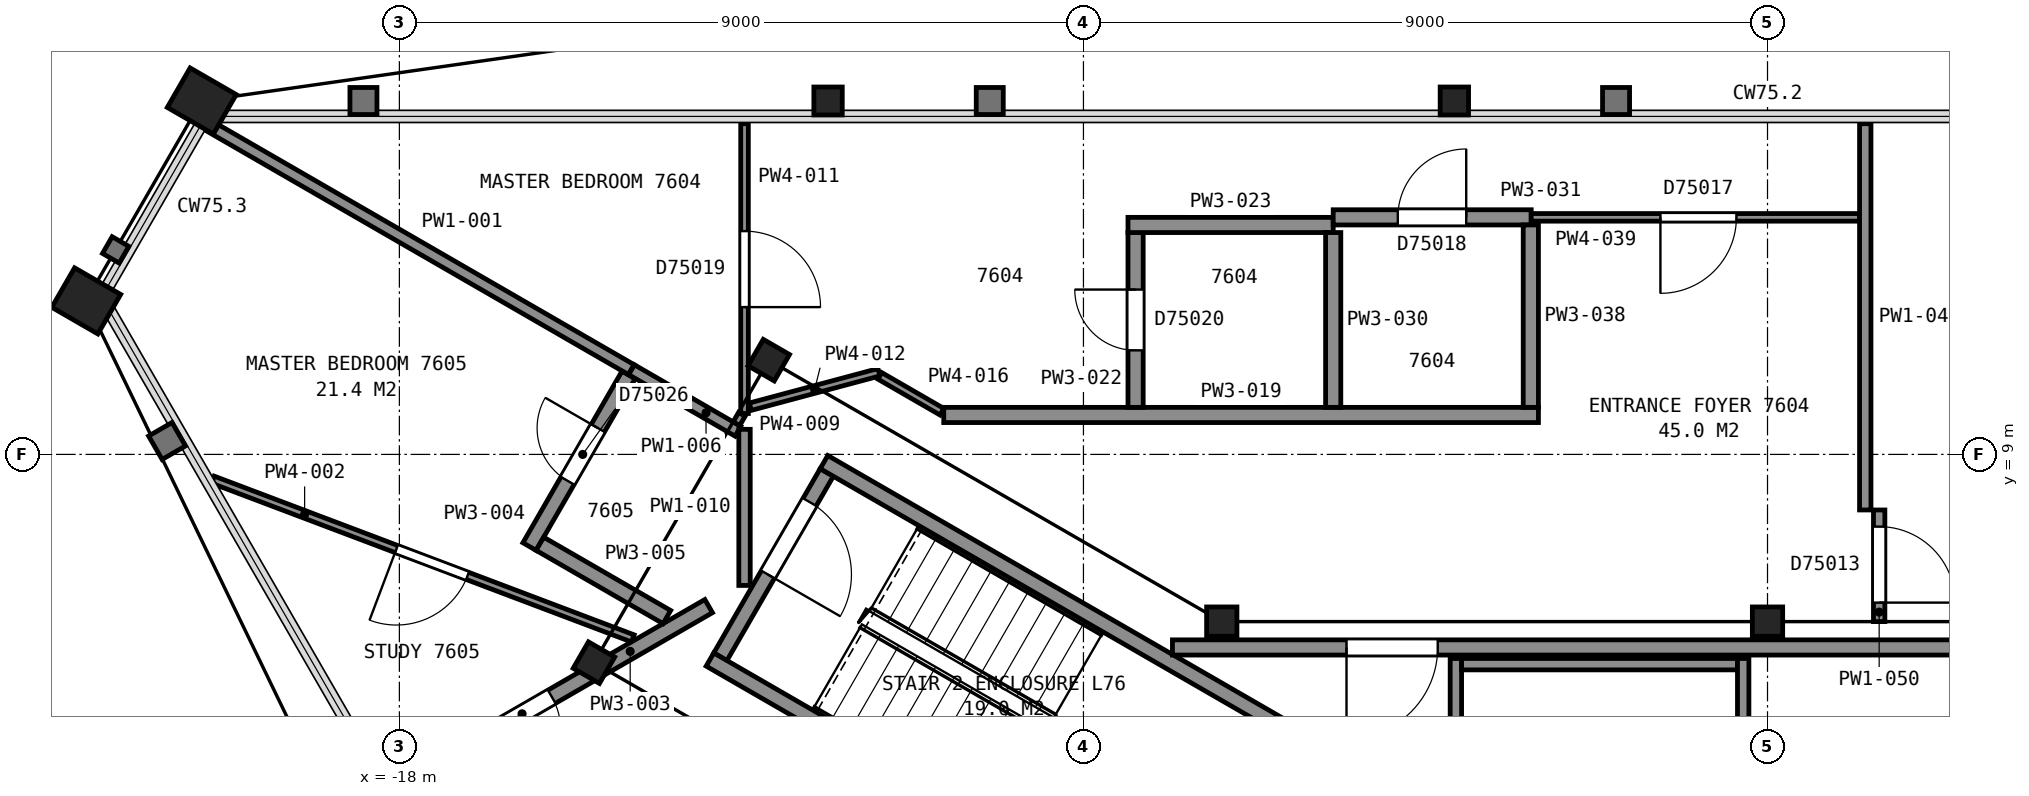
"""IFC4 building model, lengths in metres.
Left out: names, types, materials, properties, quantities, classifications, styles, units other than length and angle.
Written with IfcOpenShell. Run it as: python <this file> out.ifc"""

import sys

from ifc_helpers import new_model, si_unit, direction, frame, frame_2d, origin, origin_2d, place, context, subcontext, project, spatial, rectangle, hollow_rectangle, i_section, extrude, element, fill, save


model = new_model("IFC4")
c1 = context("Model", 3, precision=1e-05, world=origin(), true_north=direction((0.0, 1.0)))
c2 = subcontext(c1, "Body", "Model", "MODEL_VIEW")
j1 = project(units=[si_unit("LENGTHUNIT", "METRE"), si_unit("PLANEANGLEUNIT", "RADIAN")], contexts=[c1])
p1 = place(None, origin())
s1 = spatial("IfcSite", under=j1, at=p1, CompositionType="ELEMENT")
p2 = place(p1, origin())
s2 = spatial("IfcBuilding", under=s1, at=p2, CompositionType="ELEMENT")
p3 = place(p2, frame((0.0, 0.0, 301.0)))
s3 = spatial("IfcBuildingStorey", under=s2, at=p3, CompositionType="ELEMENT", Elevation=301.0)
p4 = place(p3, frame((-4.12, 13.65, 0.0), z_axis=(0.0, 0.0, 1.0), x_axis=(1.0, 0.0, 0.0)))
e1 = element("IfcColumn", 1, at=p4, inside=s3, PredefinedType="COLUMN", context=c2, shape_type="SweptSolid", body=[
    extrude(i_section(OverallWidth=0.373, OverallDepth=0.368, WebThickness=0.015, FlangeThickness=0.024, FilletRadius=0.015, at=origin_2d()), origin(), (0.0, 0.0, 1.0), 3.655),
])
p5 = place(p3, frame((-12.36, 13.65, 0.0), z_axis=(0.0, 0.0, 1.0), x_axis=(1.0, 0.0, 0.0)))
e2 = element("IfcColumn", 2, at=p5, inside=s3, PredefinedType="COLUMN", context=c2, shape_type="SweptSolid", body=[
    extrude(i_section(OverallWidth=0.373, OverallDepth=0.368, WebThickness=0.015, FlangeThickness=0.024, FilletRadius=0.015, at=origin_2d()), origin(), (0.0, 0.0, 1.0), 3.645),
])
for number, where, z_axis, x_axis in (
    (3, (-20.6, 13.65, 0.0), (0.0, 0.0, 1.0), (0.5, 0.866, 0.0)),
    (4, (-22.12, 11.02, 0.0), (0.0, 0.0, 1.0), (0.5, 0.866, 0.0)),
):
    element("IfcColumn", number, at=place(p3, frame(where, z_axis=z_axis, x_axis=x_axis)), inside=s3, PredefinedType="COLUMN", context=c2, shape_type="SweptSolid", body=[
        extrude(hollow_rectangle(XDim=0.6, YDim=0.7, WallThickness=0.04, at=origin_2d()), origin(), (0.0, 0.0, 1.0), 3.61),
    ])
for number, where, z_axis, x_axis in (
    (5, (0.0, 6.8, 0.0), (0.0, 0.0, 1.0), (1.0, 0.0, 0.0)),
    (6, (-7.18, 6.8, 0.0), (0.0, 0.0, 1.0), (1.0, 0.0, 0.0)),
):
    element("IfcColumn", number, at=place(p3, frame(where, z_axis=z_axis, x_axis=x_axis)), inside=s3, PredefinedType="COLUMN", context=c2, shape_type="SweptSolid", body=[
        extrude(i_section(OverallWidth=0.399, OverallDepth=0.386, WebThickness=0.021, FlangeThickness=0.033, FilletRadius=0.015, at=origin_2d()), origin(), (0.0, 0.0, 1.0), 3.7),
    ])
for number, where, z_axis, x_axis in (
    (7, (-13.14, 10.24, 0.0), (0.0, 0.0, 1.0), (0.5, 0.866, 0.0)),
    (8, (-15.44, 6.26, 0.0), (0.0, 0.0, 1.0), (0.5, 0.866, 0.0)),
):
    element("IfcColumn", number, at=place(p3, frame(where, z_axis=z_axis, x_axis=x_axis)), inside=s3, PredefinedType="COLUMN", context=c2, shape_type="SweptSolid", body=[
        extrude(i_section(OverallWidth=0.401, OverallDepth=0.399, WebThickness=0.025, FlangeThickness=0.04, FilletRadius=0.015, at=origin_2d()), origin(), (0.0, 0.0, 1.0), 3.7),
    ])
p6 = place(p3, frame((-12.377, 8.762, 0.0), z_axis=(0.0, 0.0, 1.0), x_axis=(-0.500049511043, -0.865996816683, 0.0)))
e9 = element("IfcWall", 9, at=p6, inside=s3, PredefinedType="PARTITIONING", context=c2, shape_type="SweptSolid", body=[
    extrude(rectangle(XDim=2.8, YDim=0.2, at=frame_2d((1.4, 0.0))), origin(), (0.0, 0.0, 1.0), 3.45),
])
p7 = place(p6, frame((0.45, 0.0, 0.0)))
e10 = element("IfcOpeningElement", 10, at=p7, cuts=e9, PredefinedType="OPENING", context=c2, shape_type="SweptSolid", body=[
    extrude(rectangle(XDim=1.1, YDim=2.1, at=frame_2d((0.55, 1.05))), frame((0.0, 0.11, 0.0), z_axis=(0.0, -1.0, 0.0), x_axis=(1.0, 0.0, 0.0)), (0.0, 0.0, 1.0), 0.22),
])
for number, where, z_axis, x_axis in (
    (11, (-7.678, 2.701, 0.0), (0.0, 0.0, 1.0), (-0.866, 0.5, 0.0)),
    (12, (-6.178, 5.299, 0.0), (0.0, 0.0, 1.0), (-0.866, 0.5, 0.0)),
):
    element("IfcWall", number, at=place(p3, frame(where, z_axis=z_axis, x_axis=x_axis)), inside=s3, PredefinedType="PARTITIONING", context=c2, shape_type="SweptSolid", body=[
        extrude(rectangle(XDim=7.2, YDim=0.2, at=frame_2d((3.6, 0.0))), origin(), (0.0, 0.0, 1.0), 3.45),
    ])
p8 = place(p3, frame((7.829, 6.46, 0.0), z_axis=(0.0, 0.0, 1.0), x_axis=(-1.0, 0.0, 0.0)))
e13 = element("IfcWall", 13, at=p8, inside=s3, PredefinedType="PARTITIONING", context=c2, shape_type="SweptSolid", body=[
    extrude(rectangle(XDim=15.658, YDim=0.2, at=frame_2d((7.829, 0.0))), origin(), (0.0, 0.0, 1.0), 3.45),
])
p9 = place(p8, frame((12.168, 0.0, 0.0)))
e14 = element("IfcOpeningElement", 14, at=p9, cuts=e13, PredefinedType="OPENING", context=c2, shape_type="SweptSolid", body=[
    extrude(rectangle(XDim=1.2, YDim=2.1, at=frame_2d((0.6, 1.05))), frame((0.0, 0.11, 0.0), z_axis=(0.0, -1.0, 0.0), x_axis=(1.0, 0.0, 0.0)), (0.0, 0.0, 1.0), 0.22),
])
p10 = place(p3, frame((-4.1, 2.085, 0.0), z_axis=(0.0, 0.0, 1.0), x_axis=(0.0, 1.0, 0.0)))
e15 = element("IfcWall", 15, at=p10, inside=s3, PredefinedType="PARTITIONING", context=c2, shape_type="SweptSolid", body=[
    extrude(rectangle(XDim=4.23, YDim=0.15, at=frame_2d((2.115, 0.0))), origin(), (0.0, 0.0, 1.0), 3.45),
])
p11 = place(p10, frame((1.625, 0.0, 0.0)))
e16 = element("IfcOpeningElement", 16, at=p11, cuts=e15, PredefinedType="OPENING", context=c2, shape_type="SweptSolid", body=[
    extrude(rectangle(XDim=1.0, YDim=2.1, at=frame_2d((0.5, 1.05))), frame((0.0, 0.085, 0.0), z_axis=(0.0, -1.0, 0.0), x_axis=(1.0, 0.0, 0.0)), (0.0, 0.0, 1.0), 0.17),
])
p12 = place(p3, frame((-4.025, 6.24, 0.0), z_axis=(0.0, 0.0, 1.0), x_axis=(1.0, 0.0, 0.0)))
e17 = element("IfcWall", 17, at=p12, inside=s3, PredefinedType="PARTITIONING", context=c2, shape_type="SweptSolid", body=[
    extrude(rectangle(XDim=3.63, YDim=0.15, at=frame_2d((1.815, 0.0))), origin(), (0.0, 0.0, 1.0), 3.45),
])
p13 = place(p3, frame((-0.32, 2.252, 0.0), z_axis=(0.0, 0.0, 1.0), x_axis=(0.0, 1.0, 0.0)))
e18 = element("IfcWall", 18, at=p13, inside=s3, PredefinedType="PARTITIONING", context=c2, shape_type="SweptSolid", body=[
    extrude(rectangle(XDim=4.063, YDim=0.15, at=frame_2d((2.031, 0.0))), origin(), (0.0, 0.0, 1.0), 3.45),
])
p14 = place(p3, frame((-20.506, 13.324, 0.0), z_axis=(0.0, 0.0, 1.0), x_axis=(0.866004971522, -0.500035388047, 0.0)))
e19 = element("IfcWall", 19, at=p14, inside=s3, PredefinedType="PARTITIONING", context=c2, shape_type="SweptSolid", body=[
    extrude(rectangle(XDim=6.416, YDim=0.15, at=frame_2d((3.208, 0.0))), origin(), (0.0, 0.0, 1.0), 2.723),
])
p15 = place(p3, frame((-20.454, 8.667, 0.0), z_axis=(0.0, 0.0, 1.0), x_axis=(0.935410436961, -0.353563734601, 0.0)))
e20 = element("IfcWall", 20, at=p15, inside=s3, PredefinedType="PARTITIONING", context=c2, shape_type="SweptSolid", body=[
    extrude(rectangle(XDim=5.907, YDim=0.1, at=frame_2d((2.953, 0.0))), origin(), (0.0, 0.0, 1.0), 2.723),
])
p16 = place(p15, frame((2.582, 0.0, 0.0)))
e21 = element("IfcOpeningElement", 21, at=p16, cuts=e20, PredefinedType="OPENING", context=c2, shape_type="SweptSolid", body=[
    extrude(rectangle(XDim=1.0, YDim=2.1, at=frame_2d((0.5, 1.05))), frame((0.0, 0.06, 0.0), z_axis=(0.0, -1.0, 0.0), x_axis=(1.0, 0.0, 0.0)), (0.0, 0.0, 1.0), 0.12),
])
p17 = place(p3, frame((-18.078, 4.61, 0.0), z_axis=(0.0, 0.0, 1.0), x_axis=(0.86606672372, 0.499928424942, 0.0)))
e22 = element("IfcWall", 22, at=p17, inside=s3, PredefinedType="PARTITIONING", context=c2, shape_type="SweptSolid", body=[
    extrude(rectangle(XDim=4.788, YDim=0.2, at=frame_2d((2.394, 0.0))), origin(), (0.0, 0.0, 1.0), 2.723),
])
p18 = place(p17, frame((1.504, 0.0, 0.0)))
e23 = element("IfcOpeningElement", 23, at=p18, cuts=e22, PredefinedType="OPENING", context=c2, shape_type="SweptSolid", body=[
    extrude(rectangle(XDim=0.9, YDim=2.1, at=frame_2d((0.45, 1.05))), frame((0.0, 0.11, 0.0), z_axis=(0.0, -1.0, 0.0), x_axis=(1.0, 0.0, 0.0)), (0.0, 0.0, 1.0), 0.22),
])
p19 = place(p3, frame((-14.985, 10.045, 0.0), z_axis=(0.0, 0.0, 1.0), x_axis=(-0.499917058339, -0.866073284879, 0.0)))
e24 = element("IfcWall", 24, at=p19, inside=s3, PredefinedType="PARTITIONING", context=c2, shape_type="SweptSolid", body=[
    extrude(rectangle(XDim=2.606, YDim=0.2, at=frame_2d((1.303, 0.0))), origin(), (0.0, 0.0, 1.0), 2.723),
])
p20 = place(p19, frame((0.806, 0.0, 0.0)))
e25 = element("IfcOpeningElement", 25, at=p20, cuts=e24, PredefinedType="OPENING", context=c2, shape_type="SweptSolid", body=[
    extrude(rectangle(XDim=0.8, YDim=2.1, at=frame_2d((0.4, 1.05))), frame((0.0, 0.11, 0.0), z_axis=(0.0, -1.0, 0.0), x_axis=(1.0, 0.0, 0.0)), (0.0, 0.0, 1.0), 0.22),
])
p21 = place(p3, frame((-16.151, 7.824, 0.0), z_axis=(0.0, 0.0, 1.0), x_axis=(0.86603803935, -0.499978113919, 0.0)))
e26 = element("IfcWall", 26, at=p21, inside=s3, PredefinedType="PARTITIONING", context=c2, shape_type="SweptSolid", body=[
    extrude(rectangle(XDim=1.929, YDim=0.2, at=frame_2d((0.964, 0.0))), origin(), (0.0, 0.0, 1.0), 2.723),
])
p22 = place(p3, frame((-14.945, 10.114, 0.0), z_axis=(0.0, 0.0, 1.0), x_axis=(0.865722560266, -0.500524173887, 0.0)))
e27 = element("IfcWall", 27, at=p22, inside=s3, PredefinedType="PARTITIONING", context=c2, shape_type="SweptSolid", body=[
    extrude(rectangle(XDim=1.616, YDim=0.15, at=frame_2d((0.808, 0.0))), origin(), (0.0, 0.0, 1.0), 2.723),
])
p23 = place(p3, frame((-13.565, 9.404, 0.0), z_axis=(0.0, 0.0, 1.0), x_axis=(0.500563174455, 0.865700010615, 0.0)))
e28 = element("IfcWall", 28, at=p23, inside=s3, PredefinedType="PARTITIONING", context=c2, shape_type="SweptSolid", body=[
    extrude(rectangle(XDim=0.142, YDim=0.1, at=frame_2d((0.071, 0.0))), origin(), (0.0, 0.0, 1.0), 2.723),
])
p24 = place(p3, frame((-13.459, 7.276, 0.0), z_axis=(0.0, 0.0, 1.0), x_axis=(0.0, 1.0, 0.0)))
e29 = element("IfcWall", 29, at=p24, inside=s3, PredefinedType="PARTITIONING", context=c2, shape_type="SweptSolid", body=[
    extrude(rectangle(XDim=2.054, YDim=0.15, at=frame_2d((1.027, 0.0))), origin(), (0.0, 0.0, 1.0), 2.723),
])
p25 = place(p3, frame((-13.459, 9.538, 0.0), z_axis=(0.0, 0.0, 1.0), x_axis=(0.0, 1.0, 0.0)))
e30 = element("IfcWall", 30, at=p25, inside=s3, PredefinedType="PARTITIONING", context=c2, shape_type="SweptSolid", body=[
    extrude(rectangle(XDim=3.813, YDim=0.1, at=frame_2d((1.906, 0.0))), origin(), (0.0, 0.0, 1.0), 2.723),
])
p26 = place(p25, frame((1.4, 0.0, 0.0)))
e31 = element("IfcOpeningElement", 31, at=p26, cuts=e30, PredefinedType="OPENING", context=c2, shape_type="SweptSolid", body=[
    extrude(rectangle(XDim=1.0, YDim=2.1, at=frame_2d((0.5, 1.05))), frame((0.0, 0.06, 0.0), z_axis=(0.0, -1.0, 0.0), x_axis=(1.0, 0.0, 0.0)), (0.0, 0.0, 1.0), 0.12),
])
p27 = place(p3, frame((-13.383, 9.628, 0.0), z_axis=(0.0, 0.0, 1.0), x_axis=(0.966010217228, 0.258503888194, 0.0)))
e32 = element("IfcWall", 32, at=p27, inside=s3, PredefinedType="PARTITIONING", context=c2, shape_type="SweptSolid", body=[
    extrude(rectangle(XDim=1.752, YDim=0.1, at=frame_2d((0.876, 0.0))), origin(), (0.0, 0.0, 1.0), 2.723),
])
p28 = place(p3, frame((-11.678, 10.033, 0.0), z_axis=(0.0, 0.0, 1.0), x_axis=(0.866116627388, -0.499841962787, 0.0)))
e33 = element("IfcWall", 33, at=p28, inside=s3, PredefinedType="PARTITIONING", context=c2, shape_type="SweptSolid", body=[
    extrude(rectangle(XDim=0.943, YDim=0.1, at=frame_2d((0.472, 0.0))), origin(), (0.0, 0.0, 1.0), 2.723),
])
p29 = place(p3, frame((-10.838, 9.519, 0.0), z_axis=(0.0, 0.0, 1.0), x_axis=(1.0, 0.0, 0.0)))
e34 = element("IfcWall", 34, at=p29, inside=s3, PredefinedType="PARTITIONING", context=c2, shape_type="SweptSolid", body=[
    extrude(rectangle(XDim=7.824, YDim=0.2, at=frame_2d((3.912, 0.0))), origin(), (0.0, 0.0, 1.0), 2.723),
])
p30 = place(p3, frame((-8.314, 11.919, 0.0), z_axis=(0.0, 0.0, 1.0), x_axis=(0.0, -1.0, 0.0)))
e35 = element("IfcWall", 35, at=p30, inside=s3, PredefinedType="PARTITIONING", context=c2, shape_type="SweptSolid", body=[
    extrude(rectangle(XDim=2.3, YDim=0.2, at=frame_2d((1.15, 0.0))), origin(), (0.0, 0.0, 1.0), 2.723),
])
p31 = place(p30, frame((0.75, 0.0, 0.0)))
e36 = element("IfcOpeningElement", 36, at=p31, cuts=e35, PredefinedType="OPENING", context=c2, shape_type="SweptSolid", body=[
    extrude(rectangle(XDim=0.8, YDim=2.1, at=frame_2d((0.4, 1.05))), frame((0.0, 0.11, 0.0), z_axis=(0.0, -1.0, 0.0), x_axis=(1.0, 0.0, 0.0)), (0.0, 0.0, 1.0), 0.22),
])
p32 = place(p3, frame((-8.414, 12.019, 0.0), z_axis=(0.0, 0.0, 1.0), x_axis=(1.0, 0.0, 0.0)))
e37 = element("IfcWall", 37, at=p32, inside=s3, PredefinedType="PARTITIONING", context=c2, shape_type="SweptSolid", body=[
    extrude(rectangle(XDim=2.7, YDim=0.2, at=frame_2d((1.35, 0.0))), origin(), (0.0, 0.0, 1.0), 2.723),
])
p33 = place(p3, frame((-5.714, 9.619, 0.0), z_axis=(0.0, 0.0, 1.0), x_axis=(0.0, 1.0, 0.0)))
e38 = element("IfcWall", 38, at=p33, inside=s3, PredefinedType="PARTITIONING", context=c2, shape_type="SweptSolid", body=[
    extrude(rectangle(XDim=2.3, YDim=0.2, at=frame_2d((1.15, 0.0))), origin(), (0.0, 0.0, 1.0), 2.723),
])
p34 = place(p3, frame((-3.109, 12.119, 0.0), z_axis=(0.0, 0.0, 1.0), x_axis=(-1.0, 0.0, 0.0)))
e39 = element("IfcWall", 39, at=p34, inside=s3, PredefinedType="PARTITIONING", context=c2, shape_type="SweptSolid", body=[
    extrude(rectangle(XDim=2.605, YDim=0.2, at=frame_2d((1.303, 0.0))), origin(), (0.0, 0.0, 1.0), 2.723),
])
p35 = place(p34, frame((0.855, 0.0, 0.0)))
e40 = element("IfcOpeningElement", 40, at=p35, cuts=e39, PredefinedType="OPENING", context=c2, shape_type="SweptSolid", body=[
    extrude(rectangle(XDim=0.9, YDim=2.1, at=frame_2d((0.45, 1.05))), frame((0.0, 0.11, 0.0), z_axis=(0.0, -1.0, 0.0), x_axis=(1.0, 0.0, 0.0)), (0.0, 0.0, 1.0), 0.22),
])
p36 = place(p3, frame((-3.114, 9.619, 0.0), z_axis=(0.0, 0.0, 1.0), x_axis=(0.0, 1.0, 0.0)))
e41 = element("IfcWall", 41, at=p36, inside=s3, PredefinedType="PARTITIONING", context=c2, shape_type="SweptSolid", body=[
    extrude(rectangle(XDim=2.4, YDim=0.2, at=frame_2d((1.2, 0.0))), origin(), (0.0, 0.0, 1.0), 2.723),
])
p37 = place(p3, frame((-3.109, 12.119, 0.0), z_axis=(0.0, 0.0, 1.0), x_axis=(1.0, 0.0, 0.0)))
e42 = element("IfcWall", 42, at=p37, inside=s3, PredefinedType="PARTITIONING", context=c2, shape_type="SweptSolid", body=[
    extrude(rectangle(XDim=4.32, YDim=0.1, at=frame_2d((2.16, 0.0))), origin(), (0.0, 0.0, 1.0), 2.723),
])
p38 = place(p37, frame((1.7, 0.0, 0.0)))
e43 = element("IfcOpeningElement", 43, at=p38, cuts=e42, PredefinedType="OPENING", context=c2, shape_type="SweptSolid", body=[
    extrude(rectangle(XDim=1.0, YDim=2.1, at=frame_2d((0.5, 1.05))), frame((0.0, 0.06, 0.0), z_axis=(0.0, -1.0, 0.0), x_axis=(1.0, 0.0, 0.0)), (0.0, 0.0, 1.0), 0.12),
])
p39 = place(p3, frame((1.286, 8.269, 0.0), z_axis=(0.0, 0.0, 1.0), x_axis=(0.0, 1.0, 0.0)))
e44 = element("IfcWall", 44, at=p39, inside=s3, PredefinedType="PARTITIONING", context=c2, shape_type="SweptSolid", body=[
    extrude(rectangle(XDim=5.082, YDim=0.15, at=frame_2d((2.541, 0.0))), origin(), (0.0, 0.0, 1.0), 2.723),
])
p40 = place(p3, frame((1.469, 8.269, 0.0), z_axis=(0.0, 0.0, 1.0), x_axis=(0.0, -1.0, 0.0)))
e45 = element("IfcWall", 45, at=p40, inside=s3, PredefinedType="PARTITIONING", context=c2, shape_type="SweptSolid", body=[
    extrude(rectangle(XDim=1.469, YDim=0.15, at=frame_2d((0.734, 0.0))), origin(), (0.0, 0.0, 1.0), 2.723),
])
p41 = place(p40, frame((0.219, 0.0, 0.0)))
e46 = element("IfcOpeningElement", 46, at=p41, cuts=e45, PredefinedType="OPENING", context=c2, shape_type="SweptSolid", body=[
    extrude(rectangle(XDim=1.0, YDim=2.1, at=frame_2d((0.5, 1.05))), frame((0.0, 0.085, 0.0), z_axis=(0.0, -1.0, 0.0), x_axis=(1.0, 0.0, 0.0)), (0.0, 0.0, 1.0), 0.17),
])
p42 = place(p7, origin())
e47 = element("IfcDoor", 47, at=p42, inside=s3, OperationType="SINGLE_SWING_RIGHT", PredefinedType="DOOR", context=c2, shape_type="SweptSolid", body=[
    extrude(rectangle(XDim=1.1, YDim=2.1, at=frame_2d((0.55, 1.05))), frame((0.0, 0.025, 0.0), z_axis=(0.0, -1.0, 0.0), x_axis=(1.0, 0.0, 0.0)), (0.0, 0.0, 1.0), 0.05),
])
fill(e10, e47)
p43 = place(p9, origin())
e48 = element("IfcDoor", 48, at=p43, inside=s3, OperationType="SINGLE_SWING_RIGHT", PredefinedType="DOOR", context=c2, shape_type="SweptSolid", body=[
    extrude(rectangle(XDim=1.2, YDim=2.1, at=frame_2d((0.6, 1.05))), frame((0.0, 0.025, 0.0), z_axis=(0.0, -1.0, 0.0), x_axis=(1.0, 0.0, 0.0)), (0.0, 0.0, 1.0), 0.05),
])
fill(e14, e48)
p44 = place(p16, origin())
e49 = element("IfcDoor", 49, at=p44, inside=s3, OperationType="SINGLE_SWING_LEFT", PredefinedType="DOOR", context=c2, shape_type="SweptSolid", body=[
    extrude(rectangle(XDim=1.0, YDim=2.1, at=frame_2d((0.5, 1.05))), frame((0.0, 0.025, 0.0), z_axis=(0.0, -1.0, 0.0), x_axis=(1.0, 0.0, 0.0)), (0.0, 0.0, 1.0), 0.05),
])
fill(e21, e49)
p45 = place(p18, origin())
e50 = element("IfcDoor", 50, at=p45, inside=s3, OperationType="SINGLE_SWING_LEFT", PredefinedType="DOOR", context=c2, shape_type="SweptSolid", body=[
    extrude(rectangle(XDim=0.9, YDim=2.1, at=frame_2d((0.45, 1.05))), frame((0.0, 0.025, 0.0), z_axis=(0.0, -1.0, 0.0), x_axis=(1.0, 0.0, 0.0)), (0.0, 0.0, 1.0), 0.05),
])
fill(e23, e50)
p46 = place(p20, origin())
e51 = element("IfcDoor", 51, at=p46, inside=s3, OperationType="SINGLE_SWING_LEFT", PredefinedType="DOOR", context=c2, shape_type="SweptSolid", body=[
    extrude(rectangle(XDim=0.8, YDim=2.1, at=frame_2d((0.4, 1.05))), frame((0.0, 0.025, 0.0), z_axis=(0.0, -1.0, 0.0), x_axis=(1.0, 0.0, 0.0)), (0.0, 0.0, 1.0), 0.05),
])
fill(e25, e51)
p47 = place(p26, origin())
e52 = element("IfcDoor", 52, at=p47, inside=s3, OperationType="SINGLE_SWING_LEFT", PredefinedType="DOOR", context=c2, shape_type="SweptSolid", body=[
    extrude(rectangle(XDim=1.0, YDim=2.1, at=frame_2d((0.5, 1.05))), frame((0.0, 0.025, 0.0), z_axis=(0.0, -1.0, 0.0), x_axis=(1.0, 0.0, 0.0)), (0.0, 0.0, 1.0), 0.05),
])
fill(e31, e52)
p48 = place(p31, origin())
e53 = element("IfcDoor", 53, at=p48, inside=s3, OperationType="SINGLE_SWING_LEFT", PredefinedType="DOOR", context=c2, shape_type="SweptSolid", body=[
    extrude(rectangle(XDim=0.8, YDim=2.1, at=frame_2d((0.4, 1.05))), frame((0.0, 0.025, 0.0), z_axis=(0.0, -1.0, 0.0), x_axis=(1.0, 0.0, 0.0)), (0.0, 0.0, 1.0), 0.05),
])
fill(e36, e53)
p49 = place(p35, origin())
e54 = element("IfcDoor", 54, at=p49, inside=s3, OperationType="SINGLE_SWING_LEFT", PredefinedType="DOOR", context=c2, shape_type="SweptSolid", body=[
    extrude(rectangle(XDim=0.9, YDim=2.1, at=frame_2d((0.45, 1.05))), frame((0.0, 0.025, 0.0), z_axis=(0.0, -1.0, 0.0), x_axis=(1.0, 0.0, 0.0)), (0.0, 0.0, 1.0), 0.05),
])
fill(e40, e54)
p50 = place(p38, origin())
e55 = element("IfcDoor", 55, at=p50, inside=s3, OperationType="SINGLE_SWING_LEFT", PredefinedType="DOOR", context=c2, shape_type="SweptSolid", body=[
    extrude(rectangle(XDim=1.0, YDim=2.1, at=frame_2d((0.5, 1.05))), frame((0.0, 0.025, 0.0), z_axis=(0.0, -1.0, 0.0), x_axis=(1.0, 0.0, 0.0)), (0.0, 0.0, 1.0), 0.05),
])
fill(e43, e55)
p51 = place(p41, origin())
e56 = element("IfcDoor", 56, at=p51, inside=s3, OperationType="SINGLE_SWING_RIGHT", PredefinedType="DOOR", context=c2, shape_type="SweptSolid", body=[
    extrude(rectangle(XDim=1.0, YDim=2.1, at=frame_2d((0.5, 1.05))), frame((0.0, 0.025, 0.0), z_axis=(0.0, -1.0, 0.0), x_axis=(1.0, 0.0, 0.0)), (0.0, 0.0, 1.0), 0.05),
])
fill(e46, e56)
save(model, sys.argv[1])
